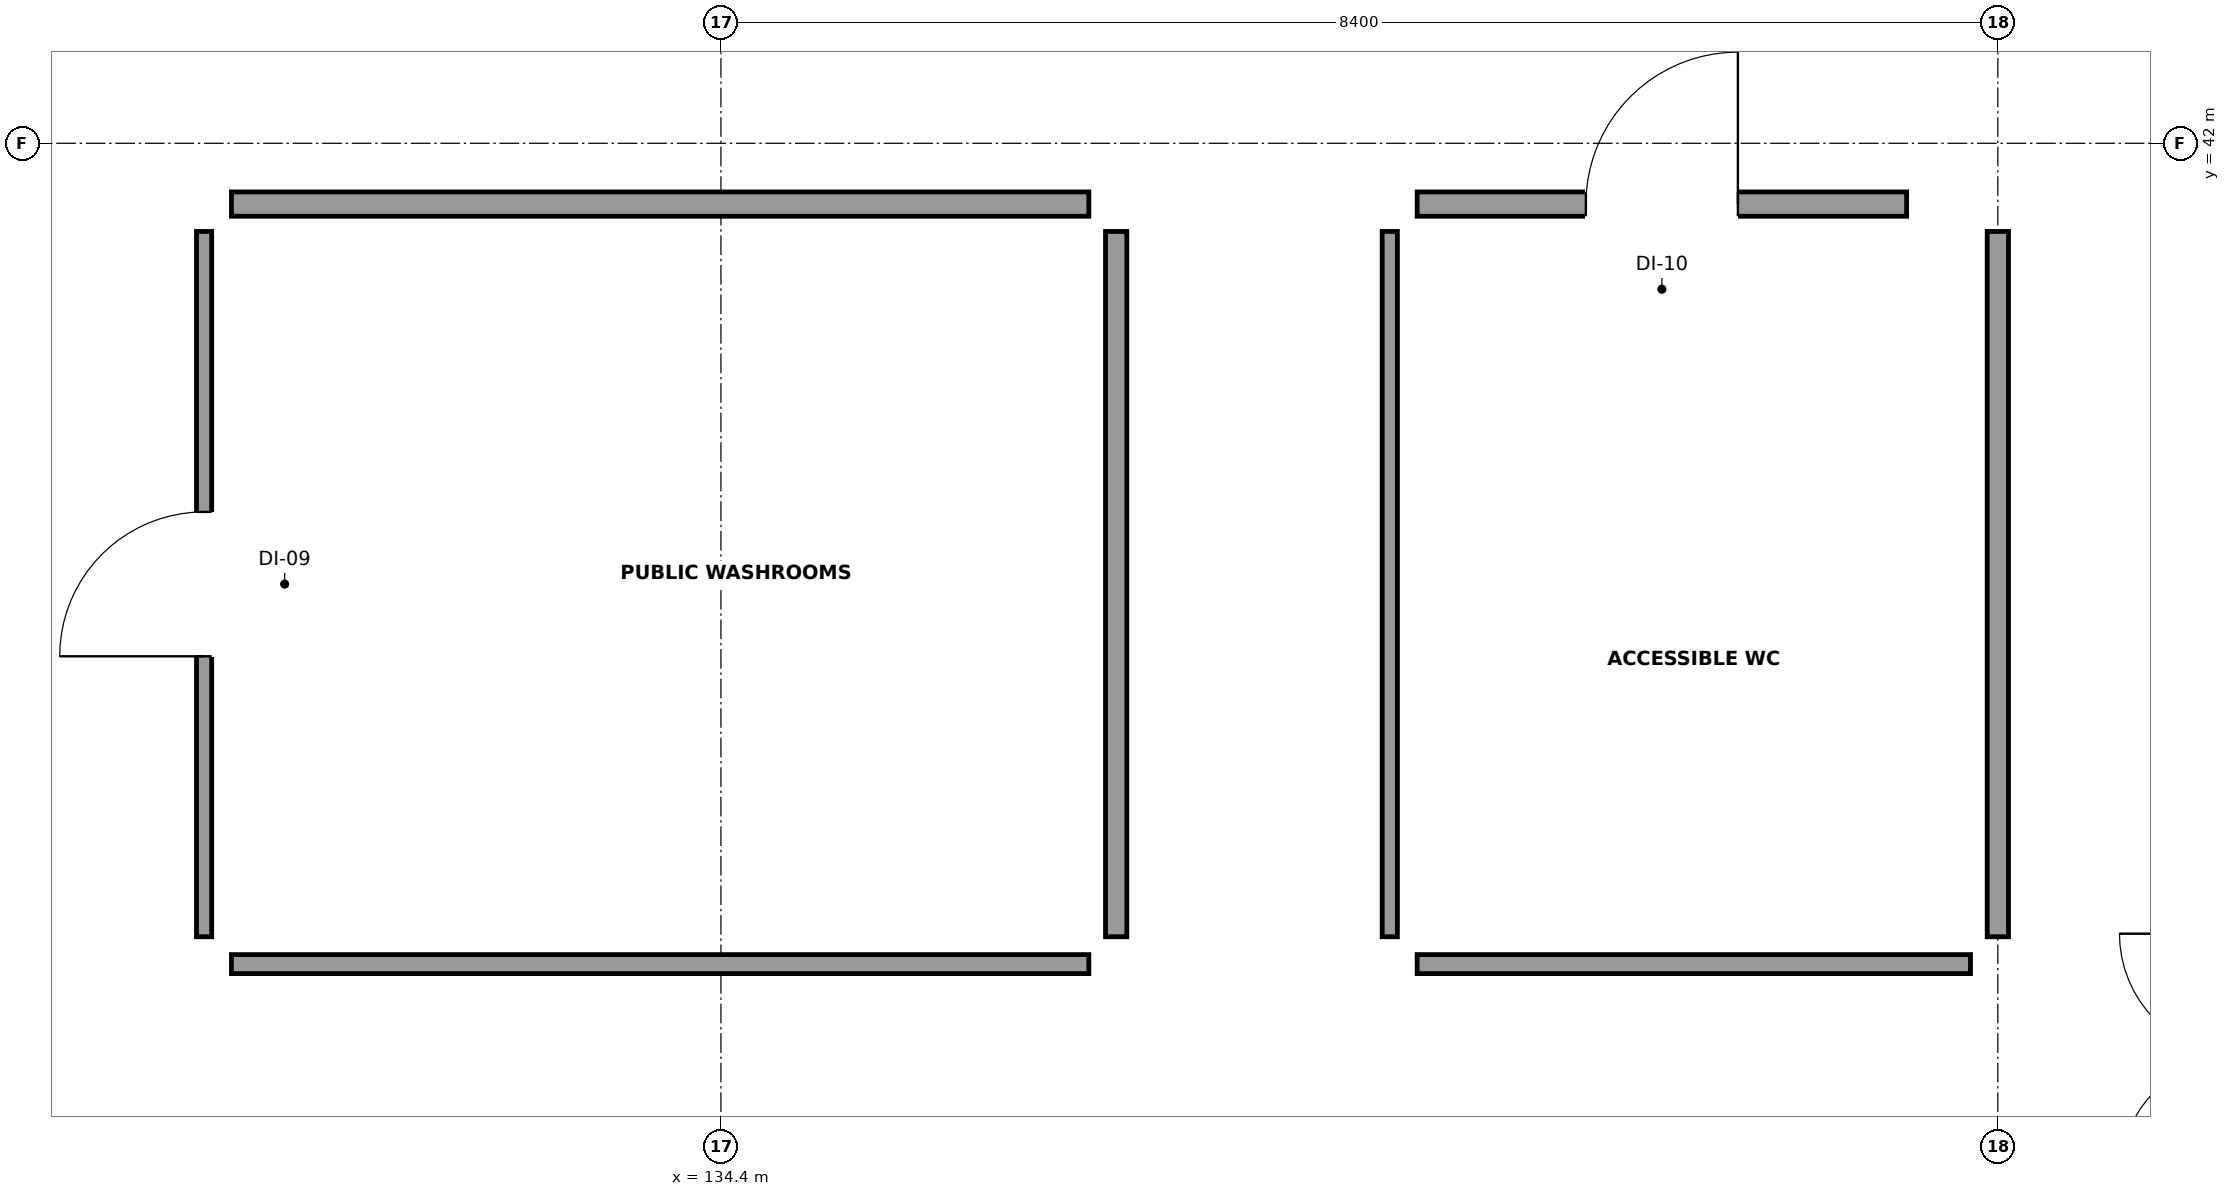
"""IFC4 building model, lengths in metres.
Left out: names, types, materials, properties, quantities, classifications, styles, units other than length and angle.
Written with IfcOpenShell. Run it as: python <this file> out.ifc"""

import sys

from ifc_helpers import new_model, si_unit, direction, frame, frame_2d, origin, origin_2d, place, context, subcontext, project, spatial, rectangle, extrude, element, fill, save


model = new_model("IFC4")
c1 = context("Model", 3, precision=1e-05, world=origin(), true_north=direction((0.0, 1.0)))
c2 = subcontext(c1, "Body", "Model", "MODEL_VIEW")
j1 = project(units=[si_unit("LENGTHUNIT", "METRE"), si_unit("PLANEANGLEUNIT", "RADIAN")], contexts=[c1])
p1 = place(None, origin())
s1 = spatial("IfcSite", under=j1, at=p1, CompositionType="ELEMENT")
p2 = place(p1, origin())
s2 = spatial("IfcBuilding", under=s1, at=p2, CompositionType="ELEMENT")
p3 = place(p2, frame((0.0, 0.0, 5.1)))
s3 = spatial("IfcBuildingStorey", under=s2, at=p3, CompositionType="ELEMENT", Elevation=5.1)
for number, where, z_axis, x_axis in (
    (1, (134.4, 42.0, 0.0), (0.0, 0.0, 1.0), (1.0, 0.0, 0.0)),
    (2, (142.8, 42.0, 0.0), (0.0, 0.0, 1.0), (1.0, 0.0, 0.0)),
):
    element("IfcColumn", number, at=place(p3, frame(where, z_axis=z_axis, x_axis=x_axis)), inside=s3, PredefinedType="COLUMN", context=c2, shape_type="SweptSolid", body=[
        extrude(rectangle(XDim=0.65, YDim=0.65, at=origin_2d()), origin(), (0.0, 0.0, 1.0), 4.8),
    ])
p4 = place(p3, frame((131.18, 41.6, 0.0), z_axis=(0.0, 0.0, 1.0), x_axis=(1.0, 0.0, 0.0)))
e3 = element("IfcWall", 3, at=p4, inside=s3, PredefinedType="PARTITIONING", context=c2, shape_type="SweptSolid", body=[
    extrude(rectangle(XDim=5.64, YDim=0.16, at=frame_2d((2.82, 0.0))), origin(), (0.0, 0.0, 1.0), 3.7),
])
p5 = place(p3, frame((137.0, 41.42, 0.0), z_axis=(0.0, 0.0, 1.0), x_axis=(0.0, -1.0, 0.0)))
e4 = element("IfcWall", 4, at=p5, inside=s3, PredefinedType="PARTITIONING", context=c2, shape_type="SweptSolid", body=[
    extrude(rectangle(XDim=4.64, YDim=0.14, at=frame_2d((2.32, 0.0))), origin(), (0.0, 0.0, 1.0), 4.5),
])
p6 = place(p3, frame((136.82, 36.6, 0.0), z_axis=(0.0, 0.0, 1.0), x_axis=(-1.0, 0.0, 0.0)))
e5 = element("IfcWall", 5, at=p6, inside=s3, PredefinedType="PARTITIONING", context=c2, shape_type="SweptSolid", body=[
    extrude(rectangle(XDim=5.64, YDim=0.125, at=frame_2d((2.82, 0.0))), origin(), (0.0, 0.0, 1.0), 4.05),
])
p7 = place(p3, frame((131.0, 36.78, 0.0), z_axis=(0.0, 0.0, 1.0), x_axis=(0.0, 1.0, 0.0)))
e6 = element("IfcWall", 6, at=p7, inside=s3, PredefinedType="PARTITIONING", context=c2, shape_type="SweptSolid", body=[
    extrude(rectangle(XDim=4.64, YDim=0.1, at=frame_2d((2.32, 0.0))), origin(), (0.0, 0.0, 1.0), 4.5),
])
p8 = place(p7, frame((1.845, 0.0, 0.0)))
e7 = element("IfcOpeningElement", 7, at=p8, cuts=e6, PredefinedType="OPENING", context=c2, shape_type="SweptSolid", body=[
    extrude(rectangle(XDim=0.95, YDim=2.1, at=frame_2d((0.475, 1.05))), frame((0.0, 0.062, 0.0), z_axis=(0.0, -1.0, 0.0), x_axis=(1.0, 0.0, 0.0)), (0.0, 0.0, 1.0), 0.124),
])
p9 = place(p3, frame((138.98, 41.6, 0.0), z_axis=(0.0, 0.0, 1.0), x_axis=(1.0, 0.0, 0.0)))
e8 = element("IfcWall", 8, at=p9, inside=s3, PredefinedType="PARTITIONING", context=c2, shape_type="SweptSolid", body=[
    extrude(rectangle(XDim=3.22, YDim=0.16, at=frame_2d((1.61, 0.0))), origin(), (0.0, 0.0, 1.0), 3.7),
])
p10 = place(p9, frame((1.11, 0.0, 0.0)))
e9 = element("IfcOpeningElement", 9, at=p10, cuts=e8, PredefinedType="OPENING", context=c2, shape_type="SweptSolid", body=[
    extrude(rectangle(XDim=1.0, YDim=2.1, at=frame_2d((0.5, 1.05))), frame((0.0, 0.092, 0.0), z_axis=(0.0, -1.0, 0.0), x_axis=(1.0, 0.0, 0.0)), (0.0, 0.0, 1.0), 0.184),
])
p11 = place(p3, frame((142.8, 41.42, 0.0), z_axis=(0.0, 0.0, 1.0), x_axis=(0.0, -1.0, 0.0)))
e10 = element("IfcWall", 10, at=p11, inside=s3, PredefinedType="PARTITIONING", context=c2, shape_type="SweptSolid", body=[
    extrude(rectangle(XDim=4.64, YDim=0.14, at=frame_2d((2.32, 0.0))), origin(), (0.0, 0.0, 1.0), 4.5),
])
p12 = place(p3, frame((142.62, 36.6, 0.0), z_axis=(0.0, 0.0, 1.0), x_axis=(-1.0, 0.0, 0.0)))
e11 = element("IfcWall", 11, at=p12, inside=s3, PredefinedType="PARTITIONING", context=c2, shape_type="SweptSolid", body=[
    extrude(rectangle(XDim=3.64, YDim=0.125, at=frame_2d((1.82, 0.0))), origin(), (0.0, 0.0, 1.0), 4.5),
])
p13 = place(p3, frame((138.8, 36.78, 0.0), z_axis=(0.0, 0.0, 1.0), x_axis=(0.0, 1.0, 0.0)))
e12 = element("IfcWall", 12, at=p13, inside=s3, PredefinedType="PARTITIONING", context=c2, shape_type="SweptSolid", body=[
    extrude(rectangle(XDim=4.64, YDim=0.1, at=frame_2d((2.32, 0.0))), origin(), (0.0, 0.0, 1.0), 4.5),
])
p14 = place(p8, origin())
e13 = element("IfcDoor", 13, at=p14, inside=s3, OperationType="SINGLE_SWING_LEFT", PredefinedType="DOOR", context=c2, shape_type="SweptSolid", body=[
    extrude(rectangle(XDim=0.95, YDim=2.1, at=frame_2d((0.475, 1.05))), frame((0.0, 0.025, 0.0), z_axis=(0.0, -1.0, 0.0), x_axis=(1.0, 0.0, 0.0)), (0.0, 0.0, 1.0), 0.05),
])
fill(e7, e13)
p15 = place(p10, origin())
e14 = element("IfcDoor", 14, at=p15, inside=s3, OperationType="SINGLE_SWING_RIGHT", PredefinedType="DOOR", context=c2, shape_type="SweptSolid", body=[
    extrude(rectangle(XDim=1.0, YDim=2.1, at=frame_2d((0.5, 1.05))), frame((0.0, 0.025, 0.0), z_axis=(0.0, -1.0, 0.0), x_axis=(1.0, 0.0, 0.0)), (0.0, 0.0, 1.0), 0.05),
])
fill(e9, e14)
save(model, sys.argv[1])
